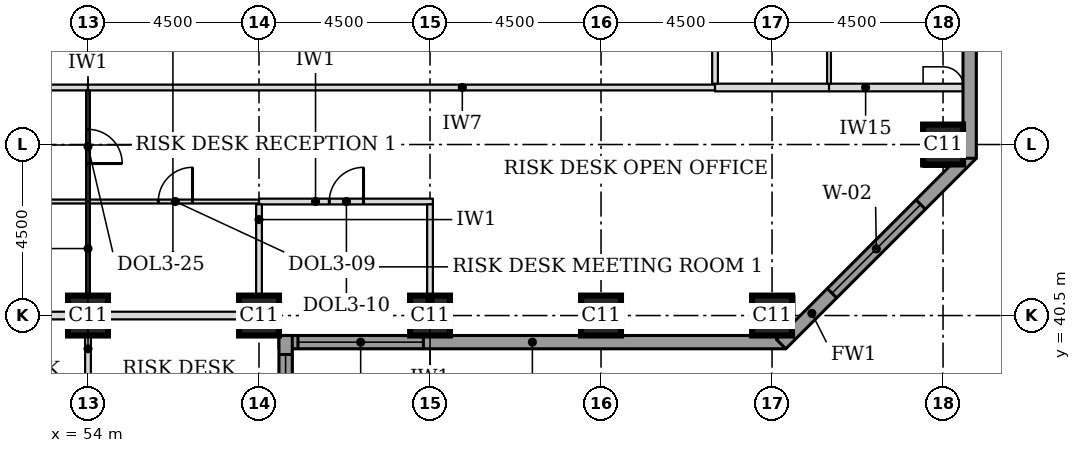
"""IFC4 building model, lengths in metres.
Left out: names, types, materials, properties, quantities, classifications, styles, units other than length and angle.
Written with IfcOpenShell. Run it as: python <this file> out.ifc"""

import sys

from ifc_helpers import new_model, si_unit, direction, frame, frame_2d, origin, origin_2d, place, context, subcontext, project, spatial, rectangle, extrude, element, fill, save


model = new_model("IFC4")
c1 = context("Model", 3, precision=1e-05, world=origin(), true_north=direction((0.0, 1.0)))
c2 = subcontext(c1, "Body", "Model", "MODEL_VIEW")
j1 = project(units=[si_unit("LENGTHUNIT", "METRE"), si_unit("PLANEANGLEUNIT", "RADIAN")], contexts=[c1])
p1 = place(None, origin())
s1 = spatial("IfcSite", under=j1, at=p1, CompositionType="ELEMENT")
p2 = place(p1, origin())
s2 = spatial("IfcBuilding", under=s1, at=p2, CompositionType="ELEMENT")
p3 = place(p2, frame((0.0, 0.0, 97.4)))
s3 = spatial("IfcBuildingStorey", under=s2, at=p3, CompositionType="ELEMENT", Elevation=97.4)
for number, where, z_axis, x_axis in (
    (1, (54.0, 40.5, 0.0), (0.0, 0.0, 1.0), (1.0, 0.0, 0.0)),
    (2, (58.5, 40.5, 0.0), (0.0, 0.0, 1.0), (1.0, 0.0, 0.0)),
    (3, (63.0, 40.5, 0.0), (0.0, 0.0, 1.0), (1.0, 0.0, 0.0)),
    (4, (67.5, 40.5, 0.0), (0.0, 0.0, 1.0), (1.0, 0.0, 0.0)),
    (5, (72.0, 40.5, 0.0), (0.0, 0.0, 1.0), (1.0, 0.0, 0.0)),
    (6, (76.5, 45.0, 0.0), (0.0, 0.0, 1.0), (1.0, 0.0, 0.0)),
):
    element("IfcColumn", number, at=place(p3, frame(where, z_axis=z_axis, x_axis=x_axis)), inside=s3, PredefinedType="COLUMN", context=c2, shape_type="SweptSolid", body=[
        extrude(rectangle(XDim=1.05, YDim=1.05, at=origin_2d()), origin(), (0.0, 0.0, 1.0), 3.7),
    ])
p4 = place(p3, frame((59.025, 39.8, 0.0), z_axis=(0.0, 0.0, 1.0), x_axis=(1.0, 0.0, 0.0)))
e7 = element("IfcWall", 7, at=p4, inside=s3, PredefinedType="STANDARD", context=c2, shape_type="SweptSolid", body=[
    extrude(rectangle(XDim=13.337, YDim=0.35, at=frame_2d((6.669, 0.0))), origin(), (0.0, 0.0, 1.0), 3.525),
])
p5 = place(p4, frame((0.5, 0.0, 0.9)))
e8 = element("IfcOpeningElement", 8, at=p5, cuts=e7, PredefinedType="OPENING", context=c2, shape_type="SweptSolid", body=[
    extrude(rectangle(XDim=3.3, YDim=1.9, at=frame_2d((1.65, 0.95))), frame((0.0, 0.185, 0.0), z_axis=(0.0, -1.0, 0.0), x_axis=(1.0, 0.0, 0.0)), (0.0, 0.0, 1.0), 0.37),
])
p6 = place(p3, frame((72.239, 39.749, 0.0), z_axis=(0.0, 0.0, 1.0), x_axis=(0.707106781187, 0.707106781187, 0.0)))
e9 = element("IfcWall", 9, at=p6, inside=s3, PredefinedType="STANDARD", context=c2, shape_type="SweptSolid", body=[
    extrude(rectangle(XDim=7.089, YDim=0.35, at=frame_2d((3.544, 0.0))), origin(), (0.0, 0.0, 1.0), 3.525),
])
p7 = place(p6, frame((1.894, 0.0, 0.9)))
e10 = element("IfcOpeningElement", 10, at=p7, cuts=e9, PredefinedType="OPENING", context=c2, shape_type="SweptSolid", body=[
    extrude(rectangle(XDim=3.3, YDim=1.9, at=frame_2d((1.65, 0.95))), frame((0.0, 0.185, 0.0), z_axis=(0.0, -1.0, 0.0), x_axis=(1.0, 0.0, 0.0)), (0.0, 0.0, 1.0), 0.37),
])
p8 = place(p3, frame((77.2, 44.638, 0.0), z_axis=(0.0, 0.0, 1.0), x_axis=(0.0, 1.0, 0.0)))
e11 = element("IfcWall", 11, at=p8, inside=s3, PredefinedType="STANDARD", context=c2, shape_type="SweptSolid", body=[
    extrude(rectangle(XDim=32.225, YDim=0.35, at=frame_2d((16.112, 0.0))), origin(), (0.0, 0.0, 1.0), 3.525),
])
p9 = place(p8, frame((5.462, 0.0, 0.9)))
e12 = element("IfcOpeningElement", 12, at=p9, cuts=e11, PredefinedType="OPENING", context=c2, shape_type="SweptSolid", body=[
    extrude(rectangle(XDim=3.3, YDim=1.9, at=frame_2d((1.65, 0.95))), frame((0.0, 0.185, 0.0), z_axis=(0.0, -1.0, 0.0), x_axis=(1.0, 0.0, 0.0)), (0.0, 0.0, 1.0), 0.37),
])
p10 = place(p8, frame((9.962, 0.0, 0.9)))
e13 = element("IfcOpeningElement", 13, at=p10, cuts=e11, PredefinedType="OPENING", context=c2, shape_type="SweptSolid", body=[
    extrude(rectangle(XDim=3.3, YDim=1.9, at=frame_2d((1.65, 0.95))), frame((0.0, 0.185, 0.0), z_axis=(0.0, -1.0, 0.0), x_axis=(1.0, 0.0, 0.0)), (0.0, 0.0, 1.0), 0.37),
])
p11 = place(p8, frame((14.462, 0.0, 0.9)))
e14 = element("IfcOpeningElement", 14, at=p11, cuts=e11, PredefinedType="OPENING", context=c2, shape_type="SweptSolid", body=[
    extrude(rectangle(XDim=3.3, YDim=1.9, at=frame_2d((1.65, 0.95))), frame((0.0, 0.185, 0.0), z_axis=(0.0, -1.0, 0.0), x_axis=(1.0, 0.0, 0.0)), (0.0, 0.0, 1.0), 0.37),
])
p12 = place(p8, frame((18.962, 0.0, 0.9)))
e15 = element("IfcOpeningElement", 15, at=p12, cuts=e11, PredefinedType="OPENING", context=c2, shape_type="SweptSolid", body=[
    extrude(rectangle(XDim=3.3, YDim=1.9, at=frame_2d((1.65, 0.95))), frame((0.0, 0.185, 0.0), z_axis=(0.0, -1.0, 0.0), x_axis=(1.0, 0.0, 0.0)), (0.0, 0.0, 1.0), 0.37),
])
p13 = place(p8, frame((23.462, 0.0, 0.9)))
e16 = element("IfcOpeningElement", 16, at=p13, cuts=e11, PredefinedType="OPENING", context=c2, shape_type="SweptSolid", body=[
    extrude(rectangle(XDim=3.3, YDim=1.9, at=frame_2d((1.65, 0.95))), frame((0.0, 0.185, 0.0), z_axis=(0.0, -1.0, 0.0), x_axis=(1.0, 0.0, 0.0)), (0.0, 0.0, 1.0), 0.37),
])
p14 = place(p3, frame((59.2, 22.138, 0.0), z_axis=(0.0, 0.0, 1.0), x_axis=(0.0, 1.0, 0.0)))
e17 = element("IfcWall", 17, at=p14, inside=s3, PredefinedType="STANDARD", context=c2, shape_type="SweptSolid", body=[
    extrude(rectangle(XDim=17.837, YDim=0.35, at=frame_2d((8.919, 0.0))), origin(), (0.0, 0.0, 1.0), 3.525),
])
p15 = place(p14, frame((5.462, 0.0, 0.9)))
e18 = element("IfcOpeningElement", 18, at=p15, cuts=e17, PredefinedType="OPENING", context=c2, shape_type="SweptSolid", body=[
    extrude(rectangle(XDim=3.3, YDim=1.9, at=frame_2d((1.65, 0.95))), frame((0.0, 0.185, 0.0), z_axis=(0.0, -1.0, 0.0), x_axis=(1.0, 0.0, 0.0)), (0.0, 0.0, 1.0), 0.37),
])
p16 = place(p14, frame((14.037, 0.0, 0.9)))
e19 = element("IfcOpeningElement", 19, at=p16, cuts=e17, PredefinedType="OPENING", context=c2, shape_type="SweptSolid", body=[
    extrude(rectangle(XDim=3.3, YDim=1.9, at=frame_2d((1.65, 0.95))), frame((0.0, 0.185, 0.0), z_axis=(0.0, -1.0, 0.0), x_axis=(1.0, 0.0, 0.0)), (0.0, 0.0, 1.0), 0.37),
])
p17 = place(p3, frame((50.015, 40.5, 0.0), z_axis=(0.0, 0.0, 1.0), x_axis=(1.0, 0.0, 0.0)))
e20 = element("IfcWall", 20, at=p17, inside=s3, PredefinedType="PARTITIONING", context=c2, shape_type="SweptSolid", body=[
    extrude(rectangle(XDim=3.46, YDim=0.2, at=frame_2d((1.73, 0.0))), origin(), (0.0, 0.0, 1.0), 2.8),
])
p18 = place(p3, frame((54.495, 40.5, 0.0), z_axis=(0.0, 0.0, 1.0), x_axis=(1.0, 0.0, 0.0)))
e21 = element("IfcWall", 21, at=p18, inside=s3, PredefinedType="PARTITIONING", context=c2, shape_type="SweptSolid", body=[
    extrude(rectangle(XDim=3.48, YDim=0.2, at=frame_2d((1.74, 0.0))), origin(), (0.0, 0.0, 1.0), 2.8),
])
p19 = place(p3, frame((49.575, 43.5, 0.0), z_axis=(0.0, 0.0, 1.0), x_axis=(1.0, 0.0, 0.0)))
e22 = element("IfcWall", 22, at=p19, inside=s3, PredefinedType="PARTITIONING", context=c2, shape_type="SweptSolid", body=[
    extrude(rectangle(XDim=4.375, YDim=0.1, at=frame_2d((2.188, 0.0))), origin(), (0.0, 0.0, 1.0), 3.55),
])
p20 = place(p19, frame((1.75, 0.0, 0.0)))
e23 = element("IfcOpeningElement", 23, at=p20, cuts=e22, PredefinedType="OPENING", context=c2, shape_type="SweptSolid", body=[
    extrude(rectangle(XDim=0.9, YDim=2.1, at=frame_2d((0.45, 1.05))), frame((0.0, 0.06, 0.0), z_axis=(0.0, -1.0, 0.0), x_axis=(1.0, 0.0, 0.0)), (0.0, 0.0, 1.0), 0.12),
])
p21 = place(p3, frame((54.05, 43.5, 0.0), z_axis=(0.0, 0.0, 1.0), x_axis=(1.0, 0.0, 0.0)))
e24 = element("IfcWall", 24, at=p21, inside=s3, PredefinedType="PARTITIONING", context=c2, shape_type="SweptSolid", body=[
    extrude(rectangle(XDim=4.45, YDim=0.1, at=frame_2d((2.225, 0.0))), origin(), (0.0, 0.0, 1.0), 3.55),
])
p22 = place(p21, frame((1.8, 0.0, 0.0)))
e25 = element("IfcOpeningElement", 25, at=p22, cuts=e24, PredefinedType="OPENING", context=c2, shape_type="SweptSolid", body=[
    extrude(rectangle(XDim=0.9, YDim=2.1, at=frame_2d((0.45, 1.05))), frame((0.0, 0.06, 0.0), z_axis=(0.0, -1.0, 0.0), x_axis=(1.0, 0.0, 0.0)), (0.0, 0.0, 1.0), 0.12),
])
p23 = place(p3, frame((58.5, 43.5, 0.0), z_axis=(0.0, 0.0, 1.0), x_axis=(1.0, 0.0, 0.0)))
e26 = element("IfcWall", 26, at=p23, inside=s3, PredefinedType="PARTITIONING", context=c2, shape_type="SweptSolid", body=[
    extrude(rectangle(XDim=4.575, YDim=0.15, at=frame_2d((2.288, 0.0))), origin(), (0.0, 0.0, 1.0), 3.55),
])
p24 = place(p23, frame((1.85, 0.0, 0.0)))
e27 = element("IfcOpeningElement", 27, at=p24, cuts=e26, PredefinedType="OPENING", context=c2, shape_type="SweptSolid", body=[
    extrude(rectangle(XDim=0.9, YDim=2.1, at=frame_2d((0.45, 1.05))), frame((0.0, 0.085, 0.0), z_axis=(0.0, -1.0, 0.0), x_axis=(1.0, 0.0, 0.0)), (0.0, 0.0, 1.0), 0.17),
])
p25 = place(p3, frame((49.425, 46.5, 0.0), z_axis=(0.0, 0.0, 1.0), x_axis=(1.0, 0.0, 0.0)))
e28 = element("IfcWall", 28, at=p25, inside=s3, PredefinedType="PARTITIONING", context=c2, shape_type="SweptSolid", body=[
    extrude(rectangle(XDim=4.575, YDim=0.15, at=frame_2d((2.288, 0.0))), origin(), (0.0, 0.0, 1.0), 3.55),
])
p26 = place(p25, frame((1.8, 0.0, 0.0)))
e29 = element("IfcOpeningElement", 29, at=p26, cuts=e28, PredefinedType="OPENING", context=c2, shape_type="SweptSolid", body=[
    extrude(rectangle(XDim=1.0, YDim=2.1, at=frame_2d((0.5, 1.05))), frame((0.0, 0.085, 0.0), z_axis=(0.0, -1.0, 0.0), x_axis=(1.0, 0.0, 0.0)), (0.0, 0.0, 1.0), 0.17),
])
p27 = place(p3, frame((54.0, 46.5, 0.0), z_axis=(0.0, 0.0, 1.0), x_axis=(1.0, 0.0, 0.0)))
e30 = element("IfcWall", 30, at=p27, inside=s3, PredefinedType="PARTITIONING", context=c2, shape_type="SweptSolid", body=[
    extrude(rectangle(XDim=16.5, YDim=0.15, at=frame_2d((8.25, 0.0))), origin(), (0.0, 0.0, 1.0), 3.55),
])
p28 = place(p3, frame((70.5, 46.5, 0.0), z_axis=(0.0, 0.0, 1.0), x_axis=(1.0, 0.0, 0.0)))
e31 = element("IfcWall", 31, at=p28, inside=s3, PredefinedType="PARTITIONING", context=c2, shape_type="SweptSolid", body=[
    extrude(rectangle(XDim=3.0, YDim=0.2, at=frame_2d((1.5, 0.0))), origin(), (0.0, 0.0, 1.0), 3.55),
])
p29 = place(p3, frame((73.5, 46.5, 0.0), z_axis=(0.0, 0.0, 1.0), x_axis=(1.0, 0.0, 0.0)))
e32 = element("IfcWall", 32, at=p29, inside=s3, PredefinedType="PARTITIONING", context=c2, shape_type="SweptSolid", body=[
    extrude(rectangle(XDim=3.525, YDim=0.2, at=frame_2d((1.762, 0.0))), origin(), (0.0, 0.0, 1.0), 3.55),
])
p30 = place(p3, frame((54.0, 36.075, 0.0), z_axis=(0.0, 0.0, 1.0), x_axis=(0.0, 1.0, 0.0)))
e33 = element("IfcWall", 33, at=p30, inside=s3, PredefinedType="PARTITIONING", context=c2, shape_type="SweptSolid", body=[
    extrude(rectangle(XDim=3.9, YDim=0.15, at=frame_2d((1.95, 0.0))), origin(), (0.0, 0.0, 1.0), 3.55),
])
p31 = place(p3, frame((63.0, 39.975, 0.0), z_axis=(0.0, 0.0, 1.0), x_axis=(0.0, 1.0, 0.0)))
e34 = element("IfcWall", 34, at=p31, inside=s3, PredefinedType="PARTITIONING", context=c2, shape_type="SweptSolid", body=[
    extrude(rectangle(XDim=3.45, YDim=0.15, at=frame_2d((1.725, 0.0))), origin(), (0.0, 0.0, 1.0), 3.55),
])
p32 = place(p3, frame((54.0, 41.025, 0.0), z_axis=(0.0, 0.0, 1.0), x_axis=(0.0, 1.0, 0.0)))
e35 = element("IfcWall", 35, at=p32, inside=s3, PredefinedType="PARTITIONING", context=c2, shape_type="SweptSolid", body=[
    extrude(rectangle(XDim=2.475, YDim=0.1, at=frame_2d((1.238, 0.0))), origin(), (0.0, 0.0, 1.0), 3.55),
])
p33 = place(p3, frame((58.5, 41.025, 0.0), z_axis=(0.0, 0.0, 1.0), x_axis=(0.0, 1.0, 0.0)))
e36 = element("IfcWall", 36, at=p33, inside=s3, PredefinedType="PARTITIONING", context=c2, shape_type="SweptSolid", body=[
    extrude(rectangle(XDim=2.4, YDim=0.15, at=frame_2d((1.2, 0.0))), origin(), (0.0, 0.0, 1.0), 3.55),
])
p34 = place(p3, frame((54.0, 43.5, 0.0), z_axis=(0.0, 0.0, 1.0), x_axis=(0.0, 1.0, 0.0)))
e37 = element("IfcWall", 37, at=p34, inside=s3, PredefinedType="PARTITIONING", context=c2, shape_type="SweptSolid", body=[
    extrude(rectangle(XDim=2.925, YDim=0.1, at=frame_2d((1.462, 0.0))), origin(), (0.0, 0.0, 1.0), 3.55),
])
p35 = place(p34, frame((1.0, 0.0, 0.0)))
e38 = element("IfcOpeningElement", 38, at=p35, cuts=e37, PredefinedType="OPENING", context=c2, shape_type="SweptSolid", body=[
    extrude(rectangle(XDim=0.9, YDim=2.1, at=frame_2d((0.45, 1.05))), frame((0.0, 0.06, 0.0), z_axis=(0.0, -1.0, 0.0), x_axis=(1.0, 0.0, 0.0)), (0.0, 0.0, 1.0), 0.12),
])
p36 = place(p3, frame((70.5, 46.6, 0.0), z_axis=(0.0, 0.0, 1.0), x_axis=(0.0, 1.0, 0.0)))
e39 = element("IfcWall", 39, at=p36, inside=s3, PredefinedType="PARTITIONING", context=c2, shape_type="SweptSolid", body=[
    extrude(rectangle(XDim=2.9, YDim=0.15, at=frame_2d((1.45, 0.0))), origin(), (0.0, 0.0, 1.0), 3.55),
])
p37 = place(p3, frame((73.5, 46.6, 0.0), z_axis=(0.0, 0.0, 1.0), x_axis=(0.0, 1.0, 0.0)))
e40 = element("IfcWall", 40, at=p37, inside=s3, PredefinedType="PARTITIONING", context=c2, shape_type="SweptSolid", body=[
    extrude(rectangle(XDim=2.85, YDim=0.1, at=frame_2d((1.425, 0.0))), origin(), (0.0, 0.0, 1.0), 3.55),
])
p38 = place(p5, origin())
e41 = element("IfcWindow", 41, at=p38, inside=s3, PartitioningType="SINGLE_PANEL", PredefinedType="WINDOW", context=c2, shape_type="SweptSolid", body=[
    extrude(rectangle(XDim=3.3, YDim=1.9, at=frame_2d((1.65, 0.95))), frame((0.0, 0.085, 0.0), z_axis=(0.0, -1.0, 0.0), x_axis=(1.0, 0.0, 0.0)), (0.0, 0.0, 1.0), 0.06),
])
fill(e8, e41)
p39 = place(p7, origin())
e42 = element("IfcWindow", 42, at=p39, inside=s3, PartitioningType="SINGLE_PANEL", PredefinedType="WINDOW", context=c2, shape_type="SweptSolid", body=[
    extrude(rectangle(XDim=3.3, YDim=1.9, at=frame_2d((1.65, 0.95))), frame((0.0, 0.085, 0.0), z_axis=(0.0, -1.0, 0.0), x_axis=(1.0, 0.0, 0.0)), (0.0, 0.0, 1.0), 0.06),
])
fill(e10, e42)
p40 = place(p16, origin())
e43 = element("IfcWindow", 43, at=p40, inside=s3, PartitioningType="SINGLE_PANEL", PredefinedType="WINDOW", context=c2, shape_type="SweptSolid", body=[
    extrude(rectangle(XDim=3.3, YDim=1.9, at=frame_2d((1.65, 0.95))), frame((0.0, 0.085, 0.0), z_axis=(0.0, -1.0, 0.0), x_axis=(1.0, 0.0, 0.0)), (0.0, 0.0, 1.0), 0.06),
])
fill(e19, e43)
p41 = place(p35, frame((0.9, 0.0, 0.0), z_axis=(0.0, 0.0, 1.0), x_axis=(-1.0, 0.0, 0.0)))
e44 = element("IfcDoor", 44, at=p41, inside=s3, OperationType="SINGLE_SWING_RIGHT", PredefinedType="DOOR", context=c2, shape_type="SweptSolid", body=[
    extrude(rectangle(XDim=0.9, YDim=2.1, at=frame_2d((0.45, 1.05))), frame((0.0, 0.025, 0.0), z_axis=(0.0, -1.0, 0.0), x_axis=(1.0, 0.0, 0.0)), (0.0, 0.0, 1.0), 0.05),
])
fill(e38, e44)
p42 = place(p22, origin())
e45 = element("IfcDoor", 45, at=p42, inside=s3, OperationType="SINGLE_SWING_RIGHT", PredefinedType="DOOR", context=c2, shape_type="SweptSolid", body=[
    extrude(rectangle(XDim=0.9, YDim=2.1, at=frame_2d((0.45, 1.05))), frame((0.0, 0.025, 0.0), z_axis=(0.0, -1.0, 0.0), x_axis=(1.0, 0.0, 0.0)), (0.0, 0.0, 1.0), 0.05),
])
fill(e25, e45)
p43 = place(p24, origin())
e46 = element("IfcDoor", 46, at=p43, inside=s3, OperationType="SINGLE_SWING_RIGHT", PredefinedType="DOOR", context=c2, shape_type="SweptSolid", body=[
    extrude(rectangle(XDim=0.9, YDim=2.1, at=frame_2d((0.45, 1.05))), frame((0.0, 0.025, 0.0), z_axis=(0.0, -1.0, 0.0), x_axis=(1.0, 0.0, 0.0)), (0.0, 0.0, 1.0), 0.05),
])
fill(e27, e46)
save(model, sys.argv[1])
